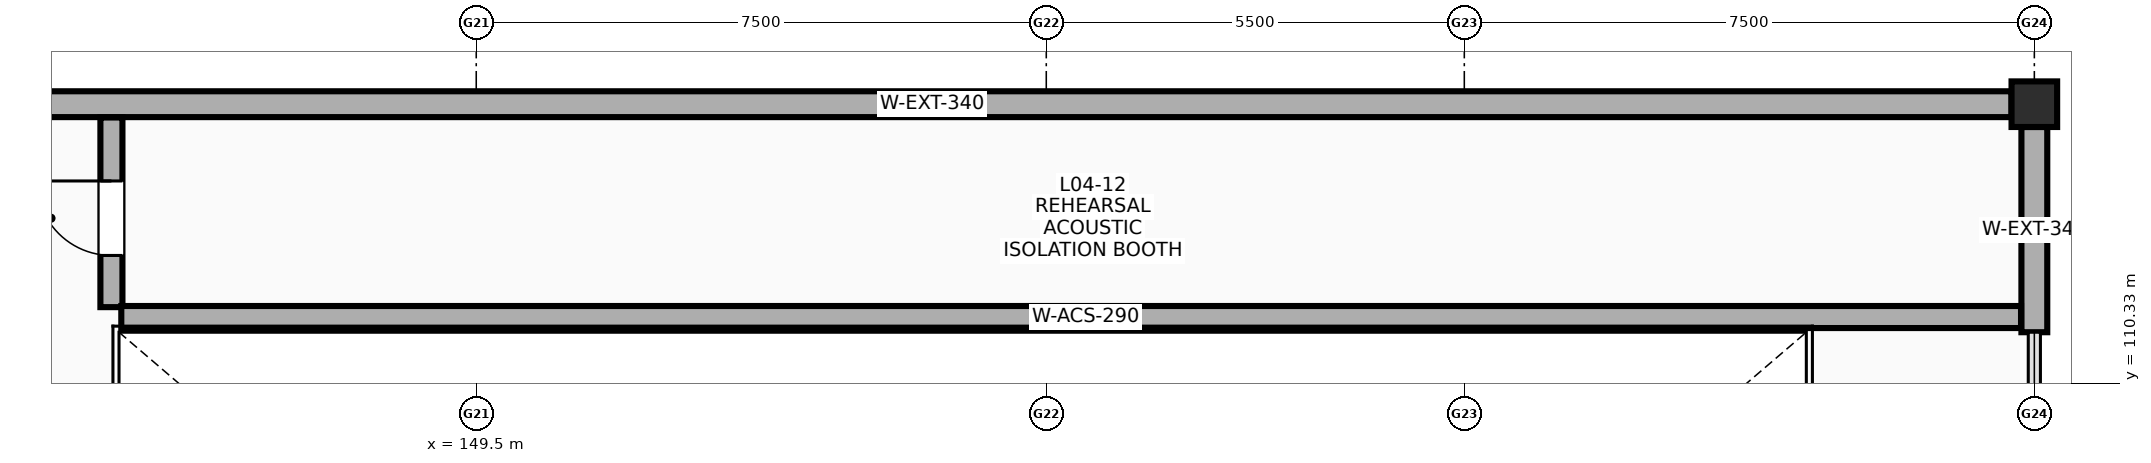
"""IFC4 building model, lengths in metres.
Left out: names, types, materials, properties, quantities, classifications, styles, units other than length and angle.
Written with IfcOpenShell. Run it as: python <this file> out.ifc"""

import sys

from ifc_helpers import new_model, si_unit, direction, frame, frame_2d, origin, origin_2d, place, context, subcontext, project, spatial, rectangle, extrude, element, fill, save


model = new_model("IFC4")
c1 = context("Model", 3, precision=1e-05, world=origin(), true_north=direction((0.0, 1.0)))
c2 = subcontext(c1, "Body", "Model", "MODEL_VIEW")
j1 = project(units=[si_unit("LENGTHUNIT", "METRE"), si_unit("PLANEANGLEUNIT", "RADIAN")], contexts=[c1])
p1 = place(None, origin())
s1 = spatial("IfcSite", under=j1, at=p1, CompositionType="ELEMENT")
p2 = place(p1, origin())
s2 = spatial("IfcBuilding", under=s1, at=p2, CompositionType="ELEMENT")
p3 = place(p2, frame((0.0, 0.0, 18.0)))
s3 = spatial("IfcBuildingStorey", under=s2, at=p3, CompositionType="ELEMENT", Elevation=18.0)
p4 = place(p3, frame((170.0, 114.0, 0.0), z_axis=(0.0, 0.0, 1.0), x_axis=(1.0, 0.0, 0.0)))
e1 = element("IfcColumn", 1, at=p4, inside=s3, PredefinedType="COLUMN", context=c2, shape_type="SweptSolid", body=[
    extrude(rectangle(XDim=0.6, YDim=0.6, at=origin_2d()), origin(), (0.0, 0.0, 1.0), 5.4),
])
p5 = place(p3, frame((170.0, 111.0, 0.0), z_axis=(0.0, 0.0, 1.0), x_axis=(0.0, 1.0, 0.0)))
e2 = element("IfcWall", 2, at=p5, inside=s3, PredefinedType="SOLIDWALL", context=c2, shape_type="SweptSolid", body=[
    extrude(rectangle(XDim=2.7, YDim=0.34, at=frame_2d((1.35, 0.0))), origin(), (0.0, 0.0, 1.0), 3.85),
])
p6 = place(p3, frame((141.3, 114.0, 0.0), z_axis=(0.0, 0.0, 1.0), x_axis=(1.0, 0.0, 0.0)))
e3 = element("IfcWall", 3, at=p6, inside=s3, PredefinedType="SOLIDWALL", context=c2, shape_type="SweptSolid", body=[
    extrude(rectangle(XDim=28.4, YDim=0.34, at=frame_2d((14.2, 0.0))), origin(), (0.0, 0.0, 1.0), 3.85),
])
p7 = place(p3, frame((144.7, 111.33, 0.0), z_axis=(0.0, 0.0, 1.0), x_axis=(0.0, 1.0, 0.0)))
e4 = element("IfcWall", 4, at=p7, inside=s3, PredefinedType="PARTITIONING", context=c2, shape_type="SweptSolid", body=[
    extrude(rectangle(XDim=2.495, YDim=0.29, at=frame_2d((1.248, 0.0))), origin(), (0.0, 0.0, 1.0), 3.93),
])
p8 = place(p7, frame((0.68, 0.0, 0.0)))
e5 = element("IfcOpeningElement", 5, at=p8, cuts=e4, PredefinedType="OPENING", context=c2, shape_type="SweptSolid", body=[
    extrude(rectangle(XDim=0.98, YDim=2.15, at=frame_2d((0.49, 1.075))), frame((0.0, 0.155, 0.0), z_axis=(0.0, -1.0, 0.0), x_axis=(1.0, 0.0, 0.0)), (0.0, 0.0, 1.0), 0.31),
])
p9 = place(p3, frame((144.83, 111.2, 0.0), z_axis=(0.0, 0.0, 1.0), x_axis=(1.0, 0.0, 0.0)))
e6 = element("IfcWall", 6, at=p9, inside=s3, PredefinedType="PARTITIONING", context=c2, shape_type="SweptSolid", body=[
    extrude(rectangle(XDim=24.995, YDim=0.29, at=frame_2d((12.498, 0.0))), origin(), (0.0, 0.0, 1.0), 4.53),
])
p10 = place(p8, origin())
e7 = element("IfcDoor", 7, at=p10, inside=s3, OperationType="SINGLE_SWING_RIGHT", PredefinedType="DOOR", context=c2, shape_type="SweptSolid", body=[
    extrude(rectangle(XDim=0.98, YDim=2.15, at=frame_2d((0.49, 1.075))), frame((0.0, 0.025, 0.0), z_axis=(0.0, -1.0, 0.0), x_axis=(1.0, 0.0, 0.0)), (0.0, 0.0, 1.0), 0.05),
])
fill(e5, e7)
save(model, sys.argv[1])
